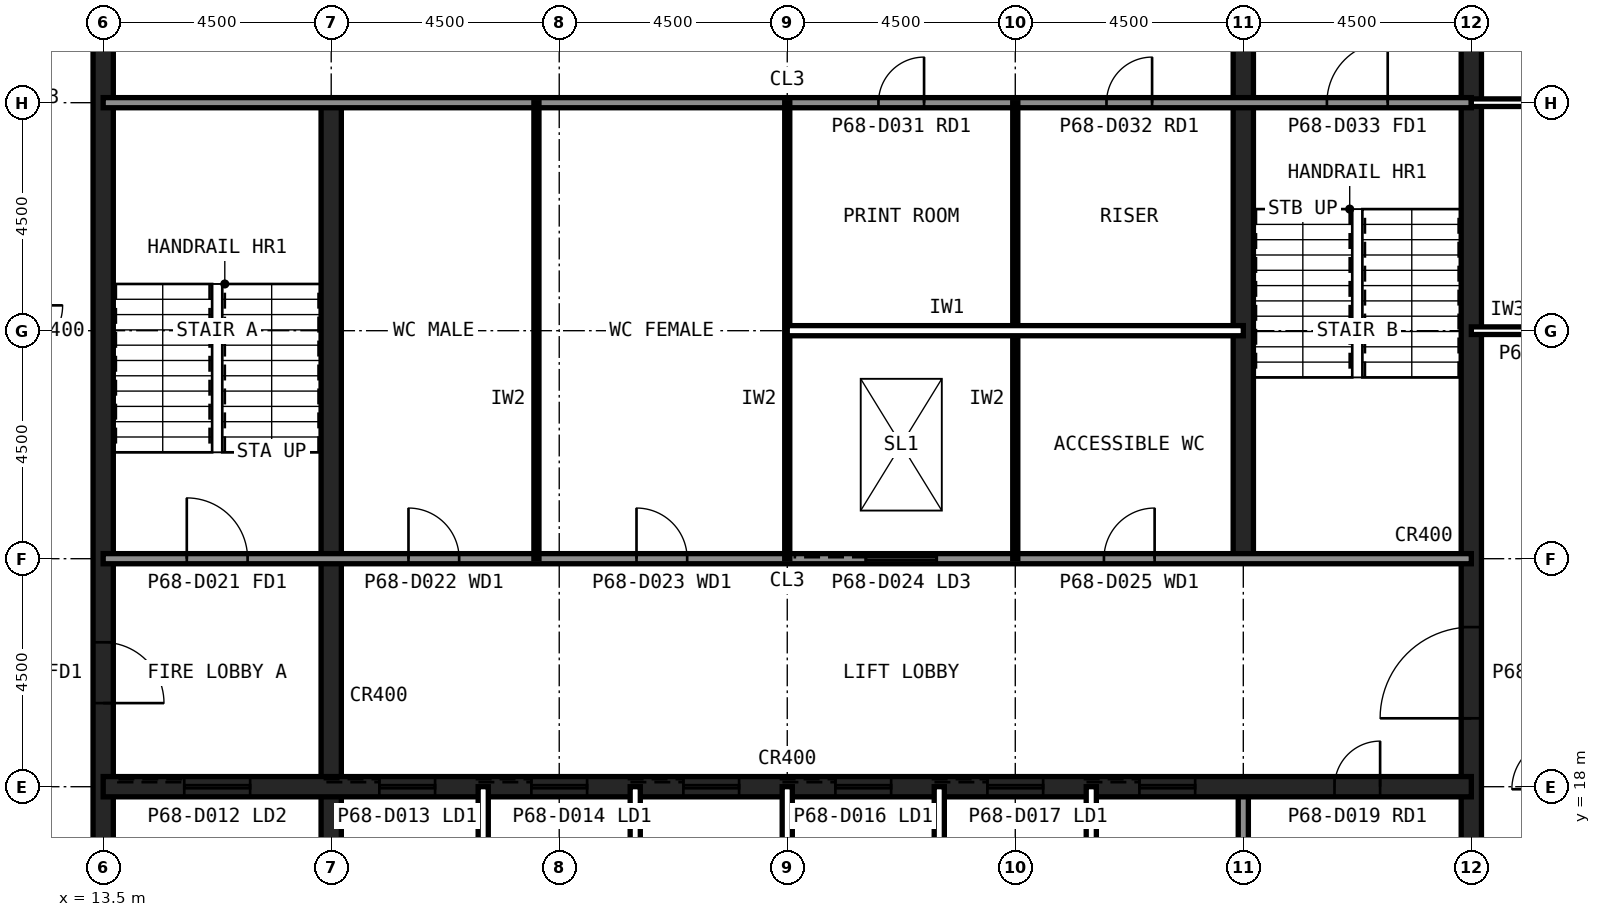
"""IFC4 building model, lengths in metres.
Left out: names, types, materials, properties, quantities, classifications, styles, units other than length and angle.
Written with IfcOpenShell. Run it as: python <this file> out.ifc"""

import sys

from ifc_helpers import new_model, si_unit, direction, frame, frame_2d, origin, place, context, subcontext, project, spatial, rectangle, extrude, element, fill, save


model = new_model("IFC4")
c1 = context("Model", 3, precision=1e-05, world=origin(), true_north=direction((0.0, 1.0)))
c2 = subcontext(c1, "Body", "Model", "MODEL_VIEW")
j1 = project(units=[si_unit("LENGTHUNIT", "METRE"), si_unit("PLANEANGLEUNIT", "RADIAN")], contexts=[c1])
p1 = place(None, origin())
s1 = spatial("IfcSite", under=j1, at=p1, CompositionType="ELEMENT")
p2 = place(p1, origin())
s2 = spatial("IfcBuilding", under=s1, at=p2, CompositionType="ELEMENT")
p3 = place(p2, frame((0.0, 0.0, 286.6)))
s3 = spatial("IfcBuildingStorey", under=s2, at=p3, CompositionType="ELEMENT", Elevation=286.6)
p4 = place(p3, frame((40.5, 13.5, 0.0), z_axis=(0.0, 0.0, 1.0), x_axis=(0.0, 1.0, 0.0)))
e1 = element("IfcWall", 1, at=p4, inside=s3, PredefinedType="SHEAR", context=c2, shape_type="SweptSolid", body=[
    extrude(rectangle(XDim=27.0, YDim=0.4, at=frame_2d((13.5, 0.0))), origin(), (0.0, 0.0, 1.0), 4.0),
])
p5 = place(p4, frame((5.85, 0.0, 0.0)))
e2 = element("IfcOpeningElement", 2, at=p5, cuts=e1, PredefinedType="OPENING", context=c2, shape_type="SweptSolid", body=[
    extrude(rectangle(XDim=1.8, YDim=2.1, at=frame_2d((0.9, 1.05))), frame((0.0, 0.21, 0.0), z_axis=(0.0, -1.0, 0.0), x_axis=(1.0, 0.0, 0.0)), (0.0, 0.0, 1.0), 0.42),
])
p6 = place(p4, frame((19.65, 0.0, 0.0)))
e3 = element("IfcOpeningElement", 3, at=p6, cuts=e1, PredefinedType="OPENING", context=c2, shape_type="SweptSolid", body=[
    extrude(rectangle(XDim=1.2, YDim=2.1, at=frame_2d((0.6, 1.05))), frame((0.0, 0.21, 0.0), z_axis=(0.0, -1.0, 0.0), x_axis=(1.0, 0.0, 0.0)), (0.0, 0.0, 1.0), 0.42),
])
p7 = place(p3, frame((13.5, 40.5, 0.0), z_axis=(0.0, 0.0, 1.0), x_axis=(0.0, -1.0, 0.0)))
e4 = element("IfcWall", 4, at=p7, inside=s3, PredefinedType="SHEAR", context=c2, shape_type="SweptSolid", body=[
    extrude(rectangle(XDim=27.0, YDim=0.4, at=frame_2d((13.5, 0.0))), origin(), (0.0, 0.0, 1.0), 4.0),
])
p8 = place(p7, frame((19.65, 0.0, 0.0)))
e5 = element("IfcOpeningElement", 5, at=p8, cuts=e4, PredefinedType="OPENING", context=c2, shape_type="SweptSolid", body=[
    extrude(rectangle(XDim=1.2, YDim=2.1, at=frame_2d((0.6, 1.05))), frame((0.0, 0.21, 0.0), z_axis=(0.0, -1.0, 0.0), x_axis=(1.0, 0.0, 0.0)), (0.0, 0.0, 1.0), 0.42),
])
p9 = place(p7, frame((5.85, 0.0, 0.0)))
e6 = element("IfcOpeningElement", 6, at=p9, cuts=e4, PredefinedType="OPENING", context=c2, shape_type="SweptSolid", body=[
    extrude(rectangle(XDim=1.8, YDim=2.1, at=frame_2d((0.9, 1.05))), frame((0.0, 0.21, 0.0), z_axis=(0.0, -1.0, 0.0), x_axis=(1.0, 0.0, 0.0)), (0.0, 0.0, 1.0), 0.42),
])
p10 = place(p3, frame((18.0, 13.5, 0.0), z_axis=(0.0, 0.0, 1.0), x_axis=(0.0, 1.0, 0.0)))
e7 = element("IfcWall", 7, at=p10, inside=s3, PredefinedType="SHEAR", context=c2, shape_type="SweptSolid", body=[
    extrude(rectangle(XDim=18.0, YDim=0.4, at=frame_2d((9.0, 0.0))), origin(), (0.0, 0.0, 1.0), 4.0),
])
p11 = place(p3, frame((36.0, 13.5, 0.0), z_axis=(0.0, 0.0, 1.0), x_axis=(0.0, 1.0, 0.0)))
e8 = element("IfcWall", 8, at=p11, inside=s3, PredefinedType="SOLIDWALL", context=c2, shape_type="SweptSolid", body=[
    extrude(rectangle(XDim=4.5, YDim=0.2, at=frame_2d((2.25, 0.0))), origin(), (0.0, 0.0, 1.0), 3.84),
])
p12 = place(p3, frame((36.0, 22.5, 0.0), z_axis=(0.0, 0.0, 1.0), x_axis=(0.0, 1.0, 0.0)))
e9 = element("IfcWall", 9, at=p12, inside=s3, PredefinedType="SHEAR", context=c2, shape_type="SweptSolid", body=[
    extrude(rectangle(XDim=18.0, YDim=0.4, at=frame_2d((9.0, 0.0))), origin(), (0.0, 0.0, 1.0), 4.0),
])
p13 = place(p3, frame((13.5, 18.0, 0.0), z_axis=(0.0, 0.0, 1.0), x_axis=(1.0, 0.0, 0.0)))
e10 = element("IfcWall", 10, at=p13, inside=s3, PredefinedType="SHEAR", context=c2, shape_type="SweptSolid", body=[
    extrude(rectangle(XDim=27.0, YDim=0.4, at=frame_2d((13.5, 0.0))), origin(), (0.0, 0.0, 1.0), 4.0),
])
p14 = place(p13, frame((24.3, 0.0, 0.0)))
e11 = element("IfcOpeningElement", 11, at=p14, cuts=e10, PredefinedType="OPENING", context=c2, shape_type="SweptSolid", body=[
    extrude(rectangle(XDim=0.9, YDim=2.1, at=frame_2d((0.45, 1.05))), frame((0.0, 0.21, 0.0), z_axis=(0.0, -1.0, 0.0), x_axis=(1.0, 0.0, 0.0)), (0.0, 0.0, 1.0), 0.42),
])
p15 = place(p13, frame((5.45, 0.0, 0.0)))
e12 = element("IfcOpeningElement", 12, at=p15, cuts=e10, PredefinedType="OPENING", context=c2, shape_type="SweptSolid", body=[
    extrude(rectangle(XDim=1.1, YDim=2.1, at=frame_2d((0.55, 1.05))), frame((0.0, 0.21, 0.0), z_axis=(0.0, -1.0, 0.0), x_axis=(1.0, 0.0, 0.0)), (0.0, 0.0, 1.0), 0.42),
])
p16 = place(p13, frame((8.45, 0.0, 0.0)))
e13 = element("IfcOpeningElement", 13, at=p16, cuts=e10, PredefinedType="OPENING", context=c2, shape_type="SweptSolid", body=[
    extrude(rectangle(XDim=1.1, YDim=2.1, at=frame_2d((0.55, 1.05))), frame((0.0, 0.21, 0.0), z_axis=(0.0, -1.0, 0.0), x_axis=(1.0, 0.0, 0.0)), (0.0, 0.0, 1.0), 0.42),
])
p17 = place(p13, frame((11.45, 0.0, 0.0)))
e14 = element("IfcOpeningElement", 14, at=p17, cuts=e10, PredefinedType="OPENING", context=c2, shape_type="SweptSolid", body=[
    extrude(rectangle(XDim=1.1, YDim=2.1, at=frame_2d((0.55, 1.05))), frame((0.0, 0.21, 0.0), z_axis=(0.0, -1.0, 0.0), x_axis=(1.0, 0.0, 0.0)), (0.0, 0.0, 1.0), 0.42),
])
p18 = place(p13, frame((14.45, 0.0, 0.0)))
e15 = element("IfcOpeningElement", 15, at=p18, cuts=e10, PredefinedType="OPENING", context=c2, shape_type="SweptSolid", body=[
    extrude(rectangle(XDim=1.1, YDim=2.1, at=frame_2d((0.55, 1.05))), frame((0.0, 0.21, 0.0), z_axis=(0.0, -1.0, 0.0), x_axis=(1.0, 0.0, 0.0)), (0.0, 0.0, 1.0), 0.42),
])
p19 = place(p13, frame((17.45, 0.0, 0.0)))
e16 = element("IfcOpeningElement", 16, at=p19, cuts=e10, PredefinedType="OPENING", context=c2, shape_type="SweptSolid", body=[
    extrude(rectangle(XDim=1.1, YDim=2.1, at=frame_2d((0.55, 1.05))), frame((0.0, 0.21, 0.0), z_axis=(0.0, -1.0, 0.0), x_axis=(1.0, 0.0, 0.0)), (0.0, 0.0, 1.0), 0.42),
])
p20 = place(p13, frame((20.45, 0.0, 0.0)))
e17 = element("IfcOpeningElement", 17, at=p20, cuts=e10, PredefinedType="OPENING", context=c2, shape_type="SweptSolid", body=[
    extrude(rectangle(XDim=1.1, YDim=2.1, at=frame_2d((0.55, 1.05))), frame((0.0, 0.21, 0.0), z_axis=(0.0, -1.0, 0.0), x_axis=(1.0, 0.0, 0.0)), (0.0, 0.0, 1.0), 0.42),
])
p21 = place(p13, frame((1.6, 0.0, 0.0)))
e18 = element("IfcOpeningElement", 18, at=p21, cuts=e10, PredefinedType="OPENING", context=c2, shape_type="SweptSolid", body=[
    extrude(rectangle(XDim=1.3, YDim=2.2, at=frame_2d((0.65, 1.1))), frame((0.0, 0.21, 0.0), z_axis=(0.0, -1.0, 0.0), x_axis=(1.0, 0.0, 0.0)), (0.0, 0.0, 1.0), 0.42),
])
p22 = place(p3, frame((13.5, 22.5, 0.0), z_axis=(0.0, 0.0, 1.0), x_axis=(1.0, 0.0, 0.0)))
e19 = element("IfcWall", 19, at=p22, inside=s3, PredefinedType="SOLIDWALL", context=c2, shape_type="SweptSolid", body=[
    extrude(rectangle(XDim=27.0, YDim=0.2, at=frame_2d((13.5, 0.0))), origin(), (0.0, 0.0, 1.0), 3.84),
])
p23 = place(p22, frame((1.65, 0.0, 0.0)))
e20 = element("IfcOpeningElement", 20, at=p23, cuts=e19, PredefinedType="OPENING", context=c2, shape_type="SweptSolid", body=[
    extrude(rectangle(XDim=1.2, YDim=2.1, at=frame_2d((0.6, 1.05))), frame((0.0, 0.11, 0.0), z_axis=(0.0, -1.0, 0.0), x_axis=(1.0, 0.0, 0.0)), (0.0, 0.0, 1.0), 0.22),
])
p24 = place(p22, frame((6.025, 0.0, 0.0)))
e21 = element("IfcOpeningElement", 21, at=p24, cuts=e19, PredefinedType="OPENING", context=c2, shape_type="SweptSolid", body=[
    extrude(rectangle(XDim=1.0, YDim=2.1, at=frame_2d((0.5, 1.05))), frame((0.0, 0.11, 0.0), z_axis=(0.0, -1.0, 0.0), x_axis=(1.0, 0.0, 0.0)), (0.0, 0.0, 1.0), 0.22),
])
p25 = place(p22, frame((10.525, 0.0, 0.0)))
e22 = element("IfcOpeningElement", 22, at=p25, cuts=e19, PredefinedType="OPENING", context=c2, shape_type="SweptSolid", body=[
    extrude(rectangle(XDim=1.0, YDim=2.1, at=frame_2d((0.5, 1.05))), frame((0.0, 0.11, 0.0), z_axis=(0.0, -1.0, 0.0), x_axis=(1.0, 0.0, 0.0)), (0.0, 0.0, 1.0), 0.22),
])
p26 = place(p22, frame((19.75, 0.0, 0.0)))
e23 = element("IfcOpeningElement", 23, at=p26, cuts=e19, PredefinedType="OPENING", context=c2, shape_type="SweptSolid", body=[
    extrude(rectangle(XDim=1.0, YDim=2.1, at=frame_2d((0.5, 1.05))), frame((0.0, 0.11, 0.0), z_axis=(0.0, -1.0, 0.0), x_axis=(1.0, 0.0, 0.0)), (0.0, 0.0, 1.0), 0.22),
])
p27 = place(p22, frame((15.05, 0.0, 0.0)))
e24 = element("IfcOpeningElement", 24, at=p27, cuts=e19, PredefinedType="OPENING", context=c2, shape_type="SweptSolid", body=[
    extrude(rectangle(XDim=1.4, YDim=2.4, at=frame_2d((0.7, 1.2))), frame((0.0, 0.11, 0.0), z_axis=(0.0, -1.0, 0.0), x_axis=(1.0, 0.0, 0.0)), (0.0, 0.0, 1.0), 0.22),
])
p28 = place(p3, frame((13.5, 31.5, 0.0), z_axis=(0.0, 0.0, 1.0), x_axis=(1.0, 0.0, 0.0)))
e25 = element("IfcWall", 25, at=p28, inside=s3, PredefinedType="SOLIDWALL", context=c2, shape_type="SweptSolid", body=[
    extrude(rectangle(XDim=27.0, YDim=0.2, at=frame_2d((13.5, 0.0))), origin(), (0.0, 0.0, 1.0), 3.84),
])
p29 = place(p28, frame((24.15, 0.0, 0.0)))
e26 = element("IfcOpeningElement", 26, at=p29, cuts=e25, PredefinedType="OPENING", context=c2, shape_type="SweptSolid", body=[
    extrude(rectangle(XDim=1.2, YDim=2.1, at=frame_2d((0.6, 1.05))), frame((0.0, 0.11, 0.0), z_axis=(0.0, -1.0, 0.0), x_axis=(1.0, 0.0, 0.0)), (0.0, 0.0, 1.0), 0.22),
])
p30 = place(p28, frame((15.3, 0.0, 0.0)))
e27 = element("IfcOpeningElement", 27, at=p30, cuts=e25, PredefinedType="OPENING", context=c2, shape_type="SweptSolid", body=[
    extrude(rectangle(XDim=0.9, YDim=2.1, at=frame_2d((0.45, 1.05))), frame((0.0, 0.11, 0.0), z_axis=(0.0, -1.0, 0.0), x_axis=(1.0, 0.0, 0.0)), (0.0, 0.0, 1.0), 0.22),
])
p31 = place(p28, frame((19.8, 0.0, 0.0)))
e28 = element("IfcOpeningElement", 28, at=p31, cuts=e25, PredefinedType="OPENING", context=c2, shape_type="SweptSolid", body=[
    extrude(rectangle(XDim=0.9, YDim=2.1, at=frame_2d((0.45, 1.05))), frame((0.0, 0.11, 0.0), z_axis=(0.0, -1.0, 0.0), x_axis=(1.0, 0.0, 0.0)), (0.0, 0.0, 1.0), 0.22),
])
for number, where, z_axis, x_axis in (
    (29, (21.0, 13.5, 0.0), (0.0, 0.0, 1.0), (0.0, 1.0, 0.0)),
    (30, (24.0, 13.5, 0.0), (0.0, 0.0, 1.0), (0.0, 1.0, 0.0)),
    (31, (27.0, 13.5, 0.0), (0.0, 0.0, 1.0), (0.0, 1.0, 0.0)),
    (32, (30.0, 13.5, 0.0), (0.0, 0.0, 1.0), (0.0, 1.0, 0.0)),
    (33, (33.0, 13.5, 0.0), (0.0, 0.0, 1.0), (0.0, 1.0, 0.0)),
):
    element("IfcWall", number, at=place(p3, frame(where, z_axis=z_axis, x_axis=x_axis)), inside=s3, PredefinedType="PARTITIONING", context=c2, shape_type="SweptSolid", body=[
        extrude(rectangle(XDim=4.5, YDim=0.2, at=frame_2d((2.25, 0.0))), origin(), (0.0, 0.0, 1.0), 3.84),
    ])
for number, where, z_axis, x_axis in (
    (34, (22.05, 22.5, 0.0), (0.0, 0.0, 1.0), (0.0, 1.0, 0.0)),
    (35, (27.0, 22.5, 0.0), (0.0, 0.0, 1.0), (0.0, 1.0, 0.0)),
    (36, (31.5, 22.5, 0.0), (0.0, 0.0, 1.0), (0.0, 1.0, 0.0)),
):
    element("IfcWall", number, at=place(p3, frame(where, z_axis=z_axis, x_axis=x_axis)), inside=s3, PredefinedType="PLUMBINGWALL", context=c2, shape_type="SweptSolid", body=[
        extrude(rectangle(XDim=9.0, YDim=0.1, at=frame_2d((4.5, 0.0))), origin(), (0.0, 0.0, 1.0), 3.84),
    ])
p32 = place(p3, frame((27.0, 27.0, 0.0), z_axis=(0.0, 0.0, 1.0), x_axis=(1.0, 0.0, 0.0)))
e37 = element("IfcWall", 37, at=p32, inside=s3, PredefinedType="PARTITIONING", context=c2, shape_type="SweptSolid", body=[
    extrude(rectangle(XDim=9.0, YDim=0.2, at=frame_2d((4.5, 0.0))), origin(), (0.0, 0.0, 1.0), 3.84),
])
p33 = place(p3, frame((40.5, 27.0, 0.0), z_axis=(0.0, 0.0, 1.0), x_axis=(1.0, 0.0, 0.0)))
e38 = element("IfcWall", 38, at=p33, inside=s3, PredefinedType="PARTITIONING", context=c2, shape_type="SweptSolid", body=[
    extrude(rectangle(XDim=3.6, YDim=0.15, at=frame_2d((1.8, 0.0))), origin(), (0.0, 0.0, 1.0), 2.989),
])
p34 = place(p33, frame((1.3, 0.0, 0.0)))
e39 = element("IfcOpeningElement", 39, at=p34, cuts=e38, PredefinedType="OPENING", context=c2, shape_type="SweptSolid", body=[
    extrude(rectangle(XDim=1.0, YDim=2.1, at=frame_2d((0.5, 1.05))), frame((0.0, 0.085, 0.0), z_axis=(0.0, -1.0, 0.0), x_axis=(1.0, 0.0, 0.0)), (0.0, 0.0, 1.0), 0.17),
])
p35 = place(p3, frame((44.1, 31.5, 0.0), z_axis=(0.0, 0.0, 1.0), x_axis=(-1.0, 0.0, 0.0)))
e40 = element("IfcWall", 40, at=p35, inside=s3, PredefinedType="PARTITIONING", context=c2, shape_type="SweptSolid", body=[
    extrude(rectangle(XDim=3.6, YDim=0.15, at=frame_2d((1.8, 0.0))), origin(), (0.0, 0.0, 1.0), 2.989),
])
p36 = place(p8, origin())
e41 = element("IfcDoor", 41, at=p36, inside=s3, OperationType="SINGLE_SWING_RIGHT", PredefinedType="DOOR", context=c2, shape_type="SweptSolid", body=[
    extrude(rectangle(XDim=1.2, YDim=2.1, at=frame_2d((0.6, 1.05))), frame((0.0, 0.025, 0.0), z_axis=(0.0, -1.0, 0.0), x_axis=(1.0, 0.0, 0.0)), (0.0, 0.0, 1.0), 0.05),
])
fill(e5, e41)
p37 = place(p5, origin())
e42 = element("IfcDoor", 42, at=p37, inside=s3, OperationType="SINGLE_SWING_LEFT", PredefinedType="DOOR", context=c2, shape_type="SweptSolid", body=[
    extrude(rectangle(XDim=1.8, YDim=2.1, at=frame_2d((0.9, 1.05))), frame((0.0, 0.025, 0.0), z_axis=(0.0, -1.0, 0.0), x_axis=(1.0, 0.0, 0.0)), (0.0, 0.0, 1.0), 0.05),
])
fill(e2, e42)
p38 = place(p23, origin())
e43 = element("IfcDoor", 43, at=p38, inside=s3, OperationType="SINGLE_SWING_LEFT", PredefinedType="DOOR", context=c2, shape_type="SweptSolid", body=[
    extrude(rectangle(XDim=1.2, YDim=2.1, at=frame_2d((0.6, 1.05))), frame((0.0, 0.025, 0.0), z_axis=(0.0, -1.0, 0.0), x_axis=(1.0, 0.0, 0.0)), (0.0, 0.0, 1.0), 0.05),
])
fill(e20, e43)
p39 = place(p29, origin())
e44 = element("IfcDoor", 44, at=p39, inside=s3, OperationType="SINGLE_SWING_RIGHT", PredefinedType="DOOR", context=c2, shape_type="SweptSolid", body=[
    extrude(rectangle(XDim=1.2, YDim=2.1, at=frame_2d((0.6, 1.05))), frame((0.0, 0.025, 0.0), z_axis=(0.0, -1.0, 0.0), x_axis=(1.0, 0.0, 0.0)), (0.0, 0.0, 1.0), 0.05),
])
fill(e26, e44)
p40 = place(p24, origin())
e45 = element("IfcDoor", 45, at=p40, inside=s3, OperationType="SINGLE_SWING_LEFT", PredefinedType="DOOR", context=c2, shape_type="SweptSolid", body=[
    extrude(rectangle(XDim=1.0, YDim=2.1, at=frame_2d((0.5, 1.05))), frame((0.0, 0.025, 0.0), z_axis=(0.0, -1.0, 0.0), x_axis=(1.0, 0.0, 0.0)), (0.0, 0.0, 1.0), 0.05),
])
fill(e21, e45)
p41 = place(p25, origin())
e46 = element("IfcDoor", 46, at=p41, inside=s3, OperationType="SINGLE_SWING_LEFT", PredefinedType="DOOR", context=c2, shape_type="SweptSolid", body=[
    extrude(rectangle(XDim=1.0, YDim=2.1, at=frame_2d((0.5, 1.05))), frame((0.0, 0.025, 0.0), z_axis=(0.0, -1.0, 0.0), x_axis=(1.0, 0.0, 0.0)), (0.0, 0.0, 1.0), 0.05),
])
fill(e22, e46)
p42 = place(p26, origin())
e47 = element("IfcDoor", 47, at=p42, inside=s3, OperationType="SINGLE_SWING_RIGHT", PredefinedType="DOOR", context=c2, shape_type="SweptSolid", body=[
    extrude(rectangle(XDim=1.0, YDim=2.1, at=frame_2d((0.5, 1.05))), frame((0.0, 0.025, 0.0), z_axis=(0.0, -1.0, 0.0), x_axis=(1.0, 0.0, 0.0)), (0.0, 0.0, 1.0), 0.05),
])
fill(e23, e47)
p43 = place(p30, origin())
e48 = element("IfcDoor", 48, at=p43, inside=s3, OperationType="SINGLE_SWING_RIGHT", PredefinedType="DOOR", context=c2, shape_type="SweptSolid", body=[
    extrude(rectangle(XDim=0.9, YDim=2.1, at=frame_2d((0.45, 1.05))), frame((0.0, 0.025, 0.0), z_axis=(0.0, -1.0, 0.0), x_axis=(1.0, 0.0, 0.0)), (0.0, 0.0, 1.0), 0.05),
])
fill(e27, e48)
p44 = place(p31, origin())
e49 = element("IfcDoor", 49, at=p44, inside=s3, OperationType="SINGLE_SWING_RIGHT", PredefinedType="DOOR", context=c2, shape_type="SweptSolid", body=[
    extrude(rectangle(XDim=0.9, YDim=2.1, at=frame_2d((0.45, 1.05))), frame((0.0, 0.025, 0.0), z_axis=(0.0, -1.0, 0.0), x_axis=(1.0, 0.0, 0.0)), (0.0, 0.0, 1.0), 0.05),
])
fill(e28, e49)
p45 = place(p14, origin())
e50 = element("IfcDoor", 50, at=p45, inside=s3, OperationType="SINGLE_SWING_RIGHT", PredefinedType="DOOR", context=c2, shape_type="SweptSolid", body=[
    extrude(rectangle(XDim=0.9, YDim=2.1, at=frame_2d((0.45, 1.05))), frame((0.0, 0.025, 0.0), z_axis=(0.0, -1.0, 0.0), x_axis=(1.0, 0.0, 0.0)), (0.0, 0.0, 1.0), 0.05),
])
fill(e11, e50)
p46 = place(p15, origin())
e51 = element("IfcDoor", 51, at=p46, inside=s3, OperationType="SLIDING_TO_LEFT", PredefinedType="DOOR", context=c2, shape_type="SweptSolid", body=[
    extrude(rectangle(XDim=1.1, YDim=2.1, at=frame_2d((0.55, 1.05))), frame((0.0, 0.025, 0.0), z_axis=(0.0, -1.0, 0.0), x_axis=(1.0, 0.0, 0.0)), (0.0, 0.0, 1.0), 0.05),
])
fill(e12, e51)
p47 = place(p16, origin())
e52 = element("IfcDoor", 52, at=p47, inside=s3, OperationType="SLIDING_TO_LEFT", PredefinedType="DOOR", context=c2, shape_type="SweptSolid", body=[
    extrude(rectangle(XDim=1.1, YDim=2.1, at=frame_2d((0.55, 1.05))), frame((0.0, 0.025, 0.0), z_axis=(0.0, -1.0, 0.0), x_axis=(1.0, 0.0, 0.0)), (0.0, 0.0, 1.0), 0.05),
])
fill(e13, e52)
p48 = place(p17, origin())
e53 = element("IfcDoor", 53, at=p48, inside=s3, OperationType="SLIDING_TO_LEFT", PredefinedType="DOOR", context=c2, shape_type="SweptSolid", body=[
    extrude(rectangle(XDim=1.1, YDim=2.1, at=frame_2d((0.55, 1.05))), frame((0.0, 0.025, 0.0), z_axis=(0.0, -1.0, 0.0), x_axis=(1.0, 0.0, 0.0)), (0.0, 0.0, 1.0), 0.05),
])
fill(e14, e53)
p49 = place(p18, origin())
e54 = element("IfcDoor", 54, at=p49, inside=s3, OperationType="SLIDING_TO_LEFT", PredefinedType="DOOR", context=c2, shape_type="SweptSolid", body=[
    extrude(rectangle(XDim=1.1, YDim=2.1, at=frame_2d((0.55, 1.05))), frame((0.0, 0.025, 0.0), z_axis=(0.0, -1.0, 0.0), x_axis=(1.0, 0.0, 0.0)), (0.0, 0.0, 1.0), 0.05),
])
fill(e15, e54)
p50 = place(p19, origin())
e55 = element("IfcDoor", 55, at=p50, inside=s3, OperationType="SLIDING_TO_LEFT", PredefinedType="DOOR", context=c2, shape_type="SweptSolid", body=[
    extrude(rectangle(XDim=1.1, YDim=2.1, at=frame_2d((0.55, 1.05))), frame((0.0, 0.025, 0.0), z_axis=(0.0, -1.0, 0.0), x_axis=(1.0, 0.0, 0.0)), (0.0, 0.0, 1.0), 0.05),
])
fill(e16, e55)
p51 = place(p20, origin())
e56 = element("IfcDoor", 56, at=p51, inside=s3, OperationType="SLIDING_TO_LEFT", PredefinedType="DOOR", context=c2, shape_type="SweptSolid", body=[
    extrude(rectangle(XDim=1.1, YDim=2.1, at=frame_2d((0.55, 1.05))), frame((0.0, 0.025, 0.0), z_axis=(0.0, -1.0, 0.0), x_axis=(1.0, 0.0, 0.0)), (0.0, 0.0, 1.0), 0.05),
])
fill(e17, e56)
p52 = place(p21, origin())
e57 = element("IfcDoor", 57, at=p52, inside=s3, OperationType="SLIDING_TO_LEFT", PredefinedType="DOOR", context=c2, shape_type="SweptSolid", body=[
    extrude(rectangle(XDim=1.3, YDim=2.2, at=frame_2d((0.65, 1.1))), frame((0.0, 0.025, 0.0), z_axis=(0.0, -1.0, 0.0), x_axis=(1.0, 0.0, 0.0)), (0.0, 0.0, 1.0), 0.05),
])
fill(e18, e57)
p53 = place(p27, origin())
e58 = element("IfcDoor", 58, at=p53, inside=s3, OperationType="SLIDING_TO_LEFT", PredefinedType="DOOR", context=c2, shape_type="SweptSolid", body=[
    extrude(rectangle(XDim=1.4, YDim=2.4, at=frame_2d((0.7, 1.2))), frame((0.0, 0.025, 0.0), z_axis=(0.0, -1.0, 0.0), x_axis=(1.0, 0.0, 0.0)), (0.0, 0.0, 1.0), 0.05),
])
fill(e24, e58)
save(model, sys.argv[1])
